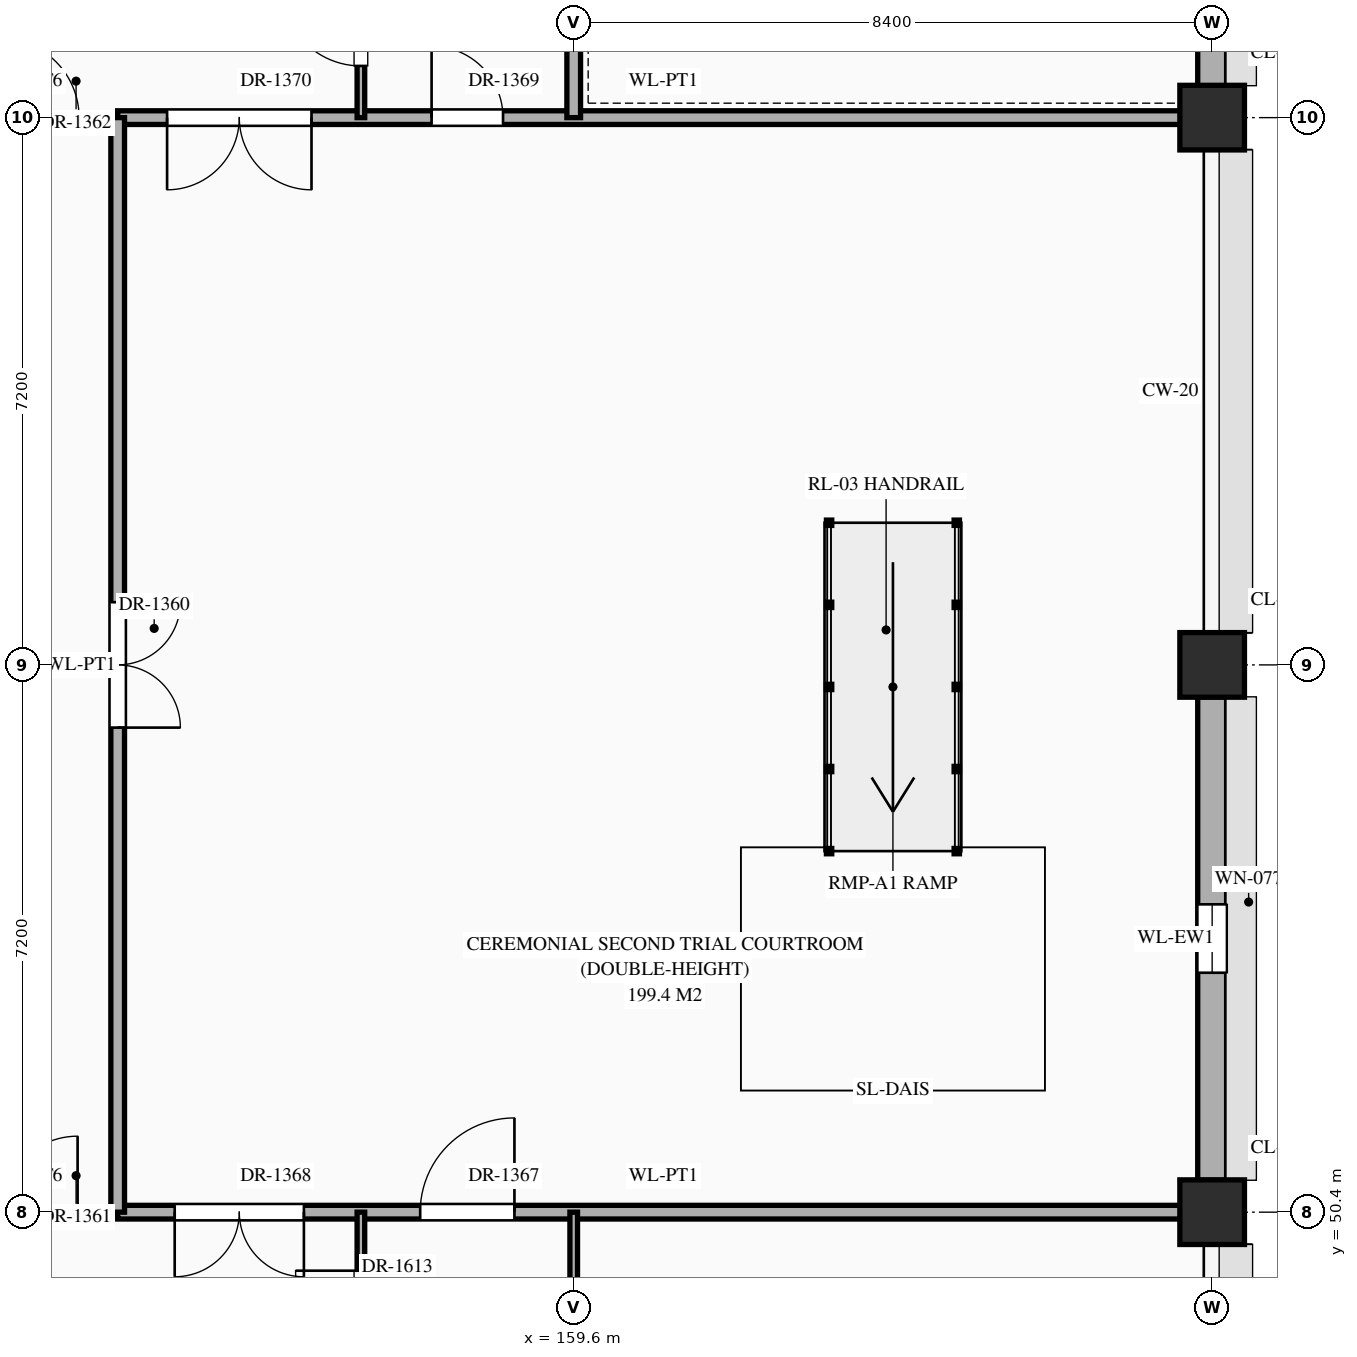
"""IFC4 building model, lengths in metres.
Left out: names, types, materials, properties, quantities, classifications, styles, units other than length and angle.
Written with IfcOpenShell. Run it as: python <this file> out.ifc"""

import sys

from ifc_helpers import new_model, si_unit, direction, frame, frame_2d, origin, origin_2d, place, context, subcontext, project, spatial, rectangle, extrude, element, fill, save


model = new_model("IFC4")
c1 = context("Model", 3, precision=1e-05, world=origin(), true_north=direction((0.0, 1.0)))
c2 = subcontext(c1, "Body", "Model", "MODEL_VIEW")
j1 = project(units=[si_unit("LENGTHUNIT", "METRE"), si_unit("PLANEANGLEUNIT", "RADIAN")], contexts=[c1])
p1 = place(None, origin())
s1 = spatial("IfcSite", under=j1, at=p1, CompositionType="ELEMENT")
p2 = place(p1, origin())
s2 = spatial("IfcBuilding", under=s1, at=p2, CompositionType="ELEMENT")
p3 = place(p2, frame((0.0, 0.0, 10.8)))
s3 = spatial("IfcBuildingStorey", under=s2, at=p3, CompositionType="ELEMENT", Elevation=10.8)
for number, where, z_axis, x_axis in (
    (1, (168.0, 50.4, 0.0), (0.0, 0.0, 1.0), (1.0, 0.0, 0.0)),
    (2, (168.0, 57.6, 0.0), (0.0, 0.0, 1.0), (1.0, 0.0, 0.0)),
    (3, (168.0, 64.8, 0.0), (0.0, 0.0, 1.0), (1.0, 0.0, 0.0)),
):
    element("IfcColumn", number, at=place(p3, frame(where, z_axis=z_axis, x_axis=x_axis)), inside=s3, PredefinedType="COLUMN", context=c2, shape_type="SweptSolid", body=[
        extrude(rectangle(XDim=0.85, YDim=0.85, at=origin_2d()), origin(), (0.0, 0.0, 1.0), 5.4),
    ])
p4 = place(p3, frame((168.0, 50.82, 0.0), z_axis=(0.0, 0.0, 1.0), x_axis=(0.0, 1.0, 0.0)))
e4 = element("IfcWall", 4, at=p4, inside=s3, PredefinedType="STANDARD", context=c2, shape_type="SweptSolid", body=[
    extrude(rectangle(XDim=6.36, YDim=0.38, at=frame_2d((3.18, 0.0))), origin(), (0.0, 0.0, 1.0), 4.47),
])
p5 = place(p4, frame((2.73, 0.0, 0.85)))
e5 = element("IfcOpeningElement", 5, at=p5, cuts=e4, PredefinedType="OPENING", context=c2, shape_type="SweptSolid", body=[
    extrude(rectangle(XDim=0.9, YDim=1.2, at=frame_2d((0.45, 0.6))), frame((0.0, 0.202, 0.0), z_axis=(0.0, -1.0, 0.0), x_axis=(1.0, 0.0, 0.0)), (0.0, 0.0, 1.0), 0.404),
])
p6 = place(p3, frame((168.0, 65.22, 0.0), z_axis=(0.0, 0.0, 1.0), x_axis=(0.0, 1.0, 0.0)))
e6 = element("IfcWall", 6, at=p6, inside=s3, PredefinedType="STANDARD", context=c2, shape_type="SweptSolid", body=[
    extrude(rectangle(XDim=6.36, YDim=0.38, at=frame_2d((3.18, 0.0))), origin(), (0.0, 0.0, 1.0), 4.47),
])
p7 = place(p6, frame((2.73, 0.0, 0.85)))
e7 = element("IfcOpeningElement", 7, at=p7, cuts=e6, PredefinedType="OPENING", context=c2, shape_type="SweptSolid", body=[
    extrude(rectangle(XDim=0.9, YDim=1.56, at=frame_2d((0.45, 0.78))), frame((0.0, 0.202, 0.0), z_axis=(0.0, -1.0, 0.0), x_axis=(1.0, 0.0, 0.0)), (0.0, 0.0, 1.0), 0.404),
])
p8 = place(p3, frame((151.24, 50.4, 0.0), z_axis=(0.0, 0.0, 1.0), x_axis=(1.0, 0.0, 0.0)))
e8 = element("IfcWall", 8, at=p8, inside=s3, PredefinedType="STANDARD", context=c2, shape_type="SweptSolid", body=[
    extrude(rectangle(XDim=2.36, YDim=0.1, at=frame_2d((1.18, 0.0))), origin(), (0.0, 0.0, 1.0), 4.07),
])
p9 = place(p8, frame((0.833, 0.0, 0.0)))
e9 = element("IfcOpeningElement", 9, at=p9, cuts=e8, PredefinedType="OPENING", context=c2, shape_type="SweptSolid", body=[
    extrude(rectangle(XDim=1.0, YDim=2.25, at=frame_2d((0.5, 1.125))), frame((0.0, 0.062, 0.0), z_axis=(0.0, -1.0, 0.0), x_axis=(1.0, 0.0, 0.0)), (0.0, 0.0, 1.0), 0.124),
])
p10 = place(p3, frame((153.6, 50.4, 0.0), z_axis=(0.0, 0.0, 1.0), x_axis=(1.0, 0.0, 0.0)))
e10 = element("IfcWall", 10, at=p10, inside=s3, PredefinedType="STANDARD", context=c2, shape_type="SweptSolid", body=[
    extrude(rectangle(XDim=14.36, YDim=0.18, at=frame_2d((7.18, 0.0))), origin(), (0.0, 0.0, 1.0), 4.07),
])
p11 = place(p10, frame((3.98, 0.0, 0.0)))
e11 = element("IfcOpeningElement", 11, at=p11, cuts=e10, PredefinedType="OPENING", context=c2, shape_type="SweptSolid", body=[
    extrude(rectangle(XDim=1.24, YDim=2.3, at=frame_2d((0.62, 1.15))), frame((0.0, 0.102, 0.0), z_axis=(0.0, -1.0, 0.0), x_axis=(1.0, 0.0, 0.0)), (0.0, 0.0, 1.0), 0.204),
])
p12 = place(p10, frame((0.75, 0.0, 0.0)))
e12 = element("IfcOpeningElement", 12, at=p12, cuts=e10, PredefinedType="OPENING", context=c2, shape_type="SweptSolid", body=[
    extrude(rectangle(XDim=1.7, YDim=2.45, at=frame_2d((0.85, 1.225))), frame((0.0, 0.102, 0.0), z_axis=(0.0, -1.0, 0.0), x_axis=(1.0, 0.0, 0.0)), (0.0, 0.0, 1.0), 0.204),
])
p13 = place(p3, frame((151.24, 64.8, 0.0), z_axis=(0.0, 0.0, 1.0), x_axis=(1.0, 0.0, 0.0)))
e13 = element("IfcWall", 13, at=p13, inside=s3, PredefinedType="STANDARD", context=c2, shape_type="SweptSolid", body=[
    extrude(rectangle(XDim=2.36, YDim=0.1, at=frame_2d((1.18, 0.0))), origin(), (0.0, 0.0, 1.0), 4.07),
])
p14 = place(p13, frame((0.812, 0.0, 0.0)))
e14 = element("IfcOpeningElement", 14, at=p14, cuts=e13, PredefinedType="OPENING", context=c2, shape_type="SweptSolid", body=[
    extrude(rectangle(XDim=1.04, YDim=2.2, at=frame_2d((0.52, 1.1))), frame((0.0, 0.062, 0.0), z_axis=(0.0, -1.0, 0.0), x_axis=(1.0, 0.0, 0.0)), (0.0, 0.0, 1.0), 0.124),
])
p15 = place(p3, frame((153.6, 64.8, 0.0), z_axis=(0.0, 0.0, 1.0), x_axis=(1.0, 0.0, 0.0)))
e15 = element("IfcWall", 15, at=p15, inside=s3, PredefinedType="STANDARD", context=c2, shape_type="SweptSolid", body=[
    extrude(rectangle(XDim=14.36, YDim=0.18, at=frame_2d((7.18, 0.0))), origin(), (0.0, 0.0, 1.0), 4.07),
])
p16 = place(p15, frame((4.13, 0.0, 0.0)))
e16 = element("IfcOpeningElement", 16, at=p16, cuts=e15, PredefinedType="OPENING", context=c2, shape_type="SweptSolid", body=[
    extrude(rectangle(XDim=0.94, YDim=2.3, at=frame_2d((0.47, 1.15))), frame((0.0, 0.102, 0.0), z_axis=(0.0, -1.0, 0.0), x_axis=(1.0, 0.0, 0.0)), (0.0, 0.0, 1.0), 0.204),
])
p17 = place(p15, frame((0.65, 0.0, 0.0)))
e17 = element("IfcOpeningElement", 17, at=p17, cuts=e15, PredefinedType="OPENING", context=c2, shape_type="SweptSolid", body=[
    extrude(rectangle(XDim=1.9, YDim=2.5, at=frame_2d((0.95, 1.25))), frame((0.0, 0.102, 0.0), z_axis=(0.0, -1.0, 0.0), x_axis=(1.0, 0.0, 0.0)), (0.0, 0.0, 1.0), 0.204),
])
p18 = place(p3, frame((153.6, 50.4, 0.0), z_axis=(0.0, 0.0, 1.0), x_axis=(0.0, 1.0, 0.0)))
e18 = element("IfcWall", 18, at=p18, inside=s3, PredefinedType="STANDARD", context=c2, shape_type="SweptSolid", body=[
    extrude(rectangle(XDim=14.4, YDim=0.18, at=frame_2d((7.2, 0.0))), origin(), (0.0, 0.0, 1.0), 5.12),
])
p19 = place(p18, frame((6.375, 0.0, 0.0)))
e19 = element("IfcOpeningElement", 19, at=p19, cuts=e18, PredefinedType="OPENING", context=c2, shape_type="SweptSolid", body=[
    extrude(rectangle(XDim=1.65, YDim=2.4, at=frame_2d((0.825, 1.2))), frame((0.0, 0.102, 0.0), z_axis=(0.0, -1.0, 0.0), x_axis=(1.0, 0.0, 0.0)), (0.0, 0.0, 1.0), 0.204),
])
p20 = place(p3, frame((156.8, 43.2, 0.0), z_axis=(0.0, 0.0, 1.0), x_axis=(0.0, 1.0, 0.0)))
e20 = element("IfcWall", 20, at=p20, inside=s3, PredefinedType="STANDARD", context=c2, shape_type="SweptSolid", body=[
    extrude(rectangle(XDim=7.2, YDim=0.1, at=frame_2d((3.6, 0.0))), origin(), (0.0, 0.0, 1.0), 5.12),
])
p21 = place(p20, frame((5.57, 0.0, 0.0)))
e21 = element("IfcOpeningElement", 21, at=p21, cuts=e20, PredefinedType="OPENING", context=c2, shape_type="SweptSolid", body=[
    extrude(rectangle(XDim=0.86, YDim=2.1, at=frame_2d((0.43, 1.05))), frame((0.0, 0.062, 0.0), z_axis=(0.0, -1.0, 0.0), x_axis=(1.0, 0.0, 0.0)), (0.0, 0.0, 1.0), 0.124),
])
p22 = place(p20, frame((1.94, 0.0, 0.0)))
e22 = element("IfcOpeningElement", 22, at=p22, cuts=e20, PredefinedType="OPENING", context=c2, shape_type="SweptSolid", body=[
    extrude(rectangle(XDim=0.92, YDim=2.15, at=frame_2d((0.46, 1.075))), frame((0.0, 0.062, 0.0), z_axis=(0.0, -1.0, 0.0), x_axis=(1.0, 0.0, 0.0)), (0.0, 0.0, 1.0), 0.124),
])
p23 = place(p3, frame((156.8, 64.8, 0.0), z_axis=(0.0, 0.0, 1.0), x_axis=(0.0, 1.0, 0.0)))
e23 = element("IfcWall", 23, at=p23, inside=s3, PredefinedType="STANDARD", context=c2, shape_type="SweptSolid", body=[
    extrude(rectangle(XDim=19.2, YDim=0.1, at=frame_2d((9.6, 0.0))), origin(), (0.0, 0.0, 1.0), 5.12),
])
p24 = place(p23, frame((16.28, 0.0, 0.0)))
e24 = element("IfcOpeningElement", 24, at=p24, cuts=e23, PredefinedType="OPENING", context=c2, shape_type="SweptSolid", body=[
    extrude(rectangle(XDim=1.04, YDim=2.2, at=frame_2d((0.52, 1.1))), frame((0.0, 0.062, 0.0), z_axis=(0.0, -1.0, 0.0), x_axis=(1.0, 0.0, 0.0)), (0.0, 0.0, 1.0), 0.124),
])
p25 = place(p23, frame((0.68, 0.0, 0.0)))
e25 = element("IfcOpeningElement", 25, at=p25, cuts=e23, PredefinedType="OPENING", context=c2, shape_type="SweptSolid", body=[
    extrude(rectangle(XDim=1.04, YDim=2.2, at=frame_2d((0.52, 1.1))), frame((0.0, 0.062, 0.0), z_axis=(0.0, -1.0, 0.0), x_axis=(1.0, 0.0, 0.0)), (0.0, 0.0, 1.0), 0.124),
])
p26 = place(p23, frame((4.26, 0.0, 0.0)))
e26 = element("IfcOpeningElement", 26, at=p26, cuts=e23, PredefinedType="OPENING", context=c2, shape_type="SweptSolid", body=[
    extrude(rectangle(XDim=1.08, YDim=2.25, at=frame_2d((0.54, 1.125))), frame((0.0, 0.062, 0.0), z_axis=(0.0, -1.0, 0.0), x_axis=(1.0, 0.0, 0.0)), (0.0, 0.0, 1.0), 0.124),
])
p27 = place(p23, frame((10.24, 0.0, 0.0)))
e27 = element("IfcOpeningElement", 27, at=p27, cuts=e23, PredefinedType="OPENING", context=c2, shape_type="SweptSolid", body=[
    extrude(rectangle(XDim=1.12, YDim=2.25, at=frame_2d((0.56, 1.125))), frame((0.0, 0.062, 0.0), z_axis=(0.0, -1.0, 0.0), x_axis=(1.0, 0.0, 0.0)), (0.0, 0.0, 1.0), 0.124),
])
p28 = place(p3, frame((159.6, 43.2, 0.0), z_axis=(0.0, 0.0, 1.0), x_axis=(0.0, 1.0, 0.0)))
e28 = element("IfcWall", 28, at=p28, inside=s3, PredefinedType="STANDARD", context=c2, shape_type="SweptSolid", body=[
    extrude(rectangle(XDim=7.2, YDim=0.1, at=frame_2d((3.6, 0.0))), origin(), (0.0, 0.0, 1.0), 5.12),
])
p29 = place(p28, frame((3.12, 0.0, 0.0)))
e29 = element("IfcOpeningElement", 29, at=p29, cuts=e28, PredefinedType="OPENING", context=c2, shape_type="SweptSolid", body=[
    extrude(rectangle(XDim=0.96, YDim=2.2, at=frame_2d((0.48, 1.1))), frame((0.0, 0.062, 0.0), z_axis=(0.0, -1.0, 0.0), x_axis=(1.0, 0.0, 0.0)), (0.0, 0.0, 1.0), 0.124),
])
p30 = place(p3, frame((159.6, 64.8, 0.0), z_axis=(0.0, 0.0, 1.0), x_axis=(0.0, 1.0, 0.0)))
e30 = element("IfcWall", 30, at=p30, inside=s3, PredefinedType="STANDARD", context=c2, shape_type="SweptSolid", body=[
    extrude(rectangle(XDim=14.4, YDim=0.18, at=frame_2d((7.2, 0.0))), origin(), (0.0, 0.0, 1.0), 5.12),
])
p31 = place(p30, frame((6.177, 0.0, 0.0)))
e31 = element("IfcOpeningElement", 31, at=p31, cuts=e30, PredefinedType="OPENING", context=c2, shape_type="SweptSolid", body=[
    extrude(rectangle(XDim=1.7, YDim=2.45, at=frame_2d((0.85, 1.225))), frame((0.0, 0.102, 0.0), z_axis=(0.0, -1.0, 0.0), x_axis=(1.0, 0.0, 0.0)), (0.0, 0.0, 1.0), 0.204),
])
p32 = place(p5, origin())
e32 = element("IfcWindow", 32, at=p32, inside=s3, PartitioningType="SINGLE_PANEL", PredefinedType="WINDOW", context=c2, shape_type="SweptSolid", body=[
    extrude(rectangle(XDim=0.9, YDim=1.2, at=frame_2d((0.45, 0.6))), frame((0.0, 0.03, 0.0), z_axis=(0.0, -1.0, 0.0), x_axis=(1.0, 0.0, 0.0)), (0.0, 0.0, 1.0), 0.06),
])
fill(e5, e32)
p33 = place(p19, frame((1.65, 0.0, 0.0), z_axis=(0.0, 0.0, 1.0), x_axis=(-1.0, 0.0, 0.0)))
e33 = element("IfcDoor", 33, at=p33, inside=s3, OperationType="DOUBLE_DOOR_SINGLE_SWING", PredefinedType="DOOR", context=c2, shape_type="SweptSolid", body=[
    extrude(rectangle(XDim=1.65, YDim=2.4, at=frame_2d((0.825, 1.2))), frame((0.0, 0.025, 0.0), z_axis=(0.0, -1.0, 0.0), x_axis=(1.0, 0.0, 0.0)), (0.0, 0.0, 1.0), 0.05),
])
fill(e19, e33)
p34 = place(p9, origin())
e34 = element("IfcDoor", 34, at=p34, inside=s3, OperationType="SINGLE_SWING_RIGHT", PredefinedType="DOOR", context=c2, shape_type="SweptSolid", body=[
    extrude(rectangle(XDim=1.0, YDim=2.25, at=frame_2d((0.5, 1.125))), frame((0.0, 0.025, 0.0), z_axis=(0.0, -1.0, 0.0), x_axis=(1.0, 0.0, 0.0)), (0.0, 0.0, 1.0), 0.05),
])
fill(e9, e34)
p35 = place(p14, origin())
e35 = element("IfcDoor", 35, at=p35, inside=s3, OperationType="SINGLE_SWING_LEFT", PredefinedType="DOOR", context=c2, shape_type="SweptSolid", body=[
    extrude(rectangle(XDim=1.04, YDim=2.2, at=frame_2d((0.52, 1.1))), frame((0.0, 0.025, 0.0), z_axis=(0.0, -1.0, 0.0), x_axis=(1.0, 0.0, 0.0)), (0.0, 0.0, 1.0), 0.05),
])
fill(e14, e35)
p36 = place(p11, origin())
e36 = element("IfcDoor", 36, at=p36, inside=s3, OperationType="SINGLE_SWING_RIGHT", PredefinedType="DOOR", context=c2, shape_type="SweptSolid", body=[
    extrude(rectangle(XDim=1.24, YDim=2.3, at=frame_2d((0.62, 1.15))), frame((0.0, 0.025, 0.0), z_axis=(0.0, -1.0, 0.0), x_axis=(1.0, 0.0, 0.0)), (0.0, 0.0, 1.0), 0.05),
])
fill(e11, e36)
p37 = place(p12, frame((1.7, 0.0, 0.0), z_axis=(0.0, 0.0, 1.0), x_axis=(-1.0, 0.0, 0.0)))
e37 = element("IfcDoor", 37, at=p37, inside=s3, OperationType="DOUBLE_DOOR_SINGLE_SWING", PredefinedType="DOOR", context=c2, shape_type="SweptSolid", body=[
    extrude(rectangle(XDim=1.7, YDim=2.45, at=frame_2d((0.85, 1.225))), frame((0.0, 0.025, 0.0), z_axis=(0.0, -1.0, 0.0), x_axis=(1.0, 0.0, 0.0)), (0.0, 0.0, 1.0), 0.05),
])
fill(e12, e37)
p38 = place(p16, origin())
e38 = element("IfcDoor", 38, at=p38, inside=s3, OperationType="SINGLE_SWING_LEFT", PredefinedType="DOOR", context=c2, shape_type="SweptSolid", body=[
    extrude(rectangle(XDim=0.94, YDim=2.3, at=frame_2d((0.47, 1.15))), frame((0.0, 0.025, 0.0), z_axis=(0.0, -1.0, 0.0), x_axis=(1.0, 0.0, 0.0)), (0.0, 0.0, 1.0), 0.05),
])
fill(e16, e38)
p39 = place(p17, frame((1.9, 0.0, 0.0), z_axis=(0.0, 0.0, 1.0), x_axis=(-1.0, 0.0, 0.0)))
e39 = element("IfcDoor", 39, at=p39, inside=s3, OperationType="DOUBLE_DOOR_SINGLE_SWING", PredefinedType="DOOR", context=c2, shape_type="SweptSolid", body=[
    extrude(rectangle(XDim=1.9, YDim=2.5, at=frame_2d((0.95, 1.25))), frame((0.0, 0.025, 0.0), z_axis=(0.0, -1.0, 0.0), x_axis=(1.0, 0.0, 0.0)), (0.0, 0.0, 1.0), 0.05),
])
fill(e17, e39)
p40 = place(p21, origin())
e40 = element("IfcDoor", 40, at=p40, inside=s3, OperationType="SINGLE_SWING_RIGHT", PredefinedType="DOOR", context=c2, shape_type="SweptSolid", body=[
    extrude(rectangle(XDim=0.86, YDim=2.1, at=frame_2d((0.43, 1.05))), frame((0.0, 0.025, 0.0), z_axis=(0.0, -1.0, 0.0), x_axis=(1.0, 0.0, 0.0)), (0.0, 0.0, 1.0), 0.05),
])
fill(e21, e40)
p41 = place(p25, origin())
e41 = element("IfcDoor", 41, at=p41, inside=s3, OperationType="SINGLE_SWING_RIGHT", PredefinedType="DOOR", context=c2, shape_type="SweptSolid", body=[
    extrude(rectangle(XDim=1.04, YDim=2.2, at=frame_2d((0.52, 1.1))), frame((0.0, 0.025, 0.0), z_axis=(0.0, -1.0, 0.0), x_axis=(1.0, 0.0, 0.0)), (0.0, 0.0, 1.0), 0.05),
])
fill(e25, e41)
save(model, sys.argv[1])
